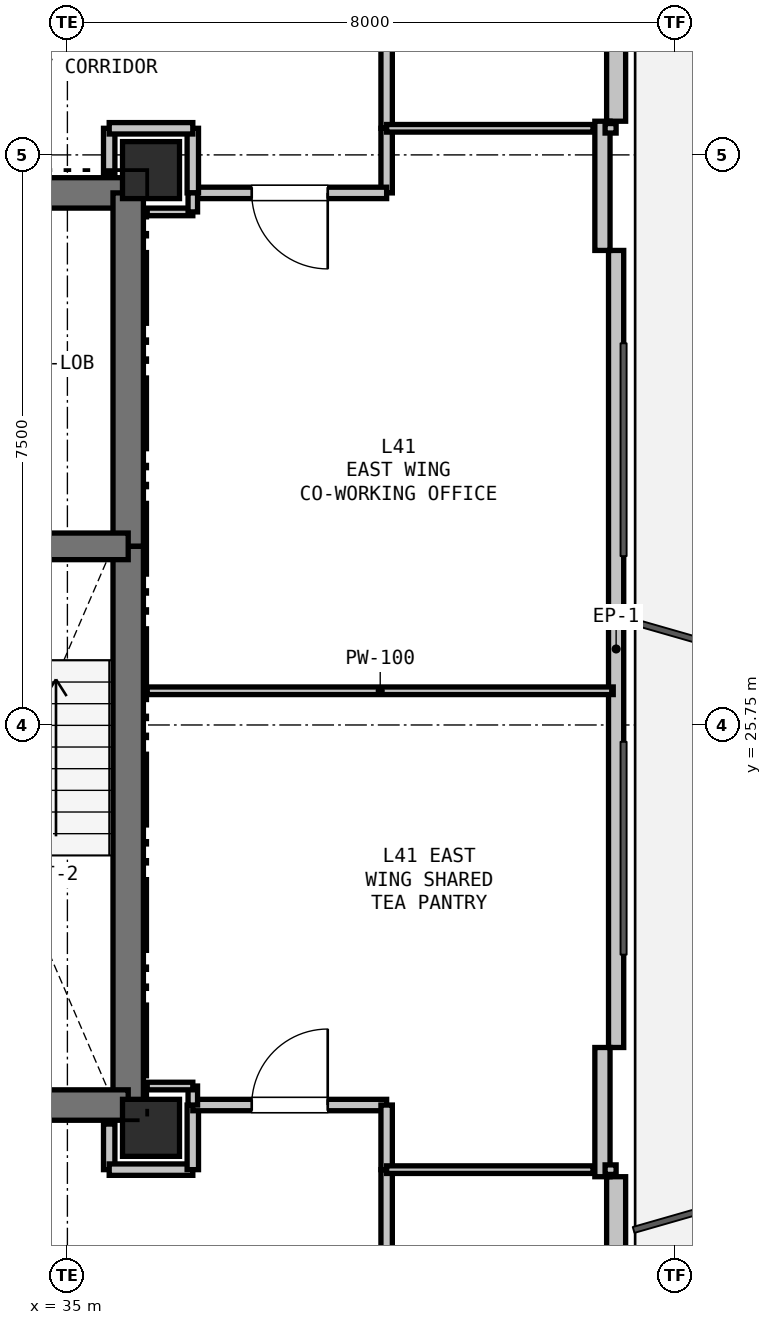
"""IFC4 building model, lengths in metres.
Left out: names, types, materials, properties, quantities, classifications, styles, units other than length and angle.
Written with IfcOpenShell. Run it as: python <this file> out.ifc"""

import sys

from ifc_helpers import new_model, si_unit, direction, frame, frame_2d, origin, origin_2d, place, context, subcontext, project, spatial, rectangle, extrude, element, fill, save


model = new_model("IFC4")
c1 = context("Model", 3, precision=1e-05, world=origin(), true_north=direction((0.0, 1.0)))
c2 = subcontext(c1, "Body", "Model", "MODEL_VIEW")
j1 = project(units=[si_unit("LENGTHUNIT", "METRE"), si_unit("PLANEANGLEUNIT", "RADIAN")], contexts=[c1])
p1 = place(None, origin())
s1 = spatial("IfcSite", under=j1, at=p1, CompositionType="ELEMENT")
p2 = place(p1, origin())
s2 = spatial("IfcBuilding", under=s1, at=p2, CompositionType="ELEMENT")
p3 = place(p2, frame((0.0, 0.0, 147.6)))
s3 = spatial("IfcBuildingStorey", under=s2, at=p3, CompositionType="ELEMENT", Elevation=147.6)
for number, where, z_axis, x_axis in (
    (1, (36.1, 33.05, 0.0), (0.0, 0.0, 1.0), (1.0, 0.0, 0.0)),
    (2, (36.1, 20.45, 0.0), (0.0, 0.0, 1.0), (1.0, 0.0, 0.0)),
):
    element("IfcColumn", number, at=place(p3, frame(where, z_axis=z_axis, x_axis=x_axis)), inside=s3, PredefinedType="COLUMN", context=c2, shape_type="SweptSolid", body=[
        extrude(rectangle(XDim=0.75, YDim=0.75, at=origin_2d()), origin(), (0.0, 0.0, 1.0), 3.3),
    ])
p4 = place(p3, frame((42.219, 44.879, 0.0), z_axis=(0.0, 0.0, 1.0), x_axis=(0.0, -1.0, 0.0)))
e3 = element("IfcWall", 3, at=p4, inside=s3, PredefinedType="SOLIDWALL", context=c2, shape_type="SweptSolid", body=[
    extrude(rectangle(XDim=11.186, YDim=0.25, at=frame_2d((5.593, 0.0))), origin(), (0.0, 0.0, 1.0), 2.68),
])
p5 = place(p4, frame((8.109, 0.0, 0.0)))
e4 = element("IfcOpeningElement", 4, at=p5, cuts=e3, PredefinedType="OPENING", context=c2, shape_type="SweptSolid", body=[
    extrude(rectangle(XDim=1.0, YDim=2.1, at=frame_2d((0.5, 1.05))), frame((0.0, 0.135, 0.0), z_axis=(0.0, -1.0, 0.0), x_axis=(1.0, 0.0, 0.0)), (0.0, 0.0, 1.0), 0.27),
])
p6 = place(p3, frame((42.219, 31.993, 0.0), z_axis=(0.0, 0.0, 1.0), x_axis=(0.0, -1.0, 0.0)))
e5 = element("IfcWall", 5, at=p6, inside=s3, PredefinedType="PARAPET", context=c2, shape_type="SweptSolid", body=[
    extrude(rectangle(XDim=10.486, YDim=0.2, at=frame_2d((5.243, 0.0))), origin(), (0.0, 0.0, 1.0), 0.2),
])
p7 = place(p3, frame((42.219, 19.807, 0.0), z_axis=(0.0, 0.0, 1.0), x_axis=(0.0, -1.0, 0.0)))
e6 = element("IfcWall", 6, at=p7, inside=s3, PredefinedType="SOLIDWALL", context=c2, shape_type="SweptSolid", body=[
    extrude(rectangle(XDim=11.186, YDim=0.25, at=frame_2d((5.593, 0.0))), origin(), (0.0, 0.0, 1.0), 2.68),
])
p8 = place(p7, frame((9.227, 0.0, 0.9)))
e7 = element("IfcOpeningElement", 7, at=p8, cuts=e6, PredefinedType="OPENING", context=c2, shape_type="SweptSolid", body=[
    extrude(rectangle(XDim=1.2, YDim=1.4, at=frame_2d((0.6, 0.7))), frame((0.0, 0.135, 0.0), z_axis=(0.0, -1.0, 0.0), x_axis=(1.0, 0.0, 0.0)), (0.0, 0.0, 1.0), 0.27),
])
for number, where, z_axis, x_axis in (
    (8, (42.039, 33.693, 0.0), (0.0, 0.0, 1.0), (0.0, -1.0, 0.0)),
    (9, (42.039, 21.507, 0.0), (0.0, 0.0, 1.0), (0.0, -1.0, 0.0)),
):
    element("IfcWall", number, at=place(p3, frame(where, z_axis=z_axis, x_axis=x_axis)), inside=s3, PredefinedType="PARAPET", context=c2, shape_type="SweptSolid", body=[
        extrude(rectangle(XDim=1.7, YDim=0.2, at=frame_2d((0.85, 0.0))), origin(), (0.0, 0.0, 1.0), 2.68),
    ])
p9 = place(p3, frame((32.35, 32.75, 0.0), z_axis=(0.0, 0.0, 1.0), x_axis=(1.0, 0.0, 0.0)))
e10 = element("IfcWall", 10, at=p9, inside=s3, PredefinedType="SHEAR", context=c2, shape_type="SweptSolid", body=[
    extrude(rectangle(XDim=3.45, YDim=0.4, at=frame_2d((1.725, 0.0))), origin(), (0.0, 0.0, 1.0), 3.06),
])
p10 = place(p9, frame((0.65, 0.0, 0.0)))
e11 = element("IfcOpeningElement", 11, at=p10, cuts=e10, PredefinedType="OPENING", context=c2, shape_type="SweptSolid", body=[
    extrude(rectangle(XDim=1.15, YDim=2.15, at=frame_2d((0.575, 1.075))), frame((0.0, 0.21, 0.0), z_axis=(0.0, -1.0, 0.0), x_axis=(1.0, 0.0, 0.0)), (0.0, 0.0, 1.0), 0.42),
])
p11 = place(p3, frame((35.8, 32.75, 0.0), z_axis=(0.0, 0.0, 1.0), x_axis=(0.0, -1.0, 0.0)))
e12 = element("IfcWall", 12, at=p11, inside=s3, PredefinedType="SHEAR", context=c2, shape_type="SweptSolid", body=[
    extrude(rectangle(XDim=4.65, YDim=0.4, at=frame_2d((2.325, 0.0))), origin(), (0.0, 0.0, 1.0), 3.06),
])
p12 = place(p3, frame((35.8, 28.1, 0.0), z_axis=(0.0, 0.0, 1.0), x_axis=(0.0, -1.0, 0.0)))
e13 = element("IfcWall", 13, at=p12, inside=s3, PredefinedType="SHEAR", context=c2, shape_type="SweptSolid", body=[
    extrude(rectangle(XDim=7.35, YDim=0.4, at=frame_2d((3.675, 0.0))), origin(), (0.0, 0.0, 1.0), 3.06),
])
p13 = place(p3, frame((35.8, 20.75, 0.0), z_axis=(0.0, 0.0, 1.0), x_axis=(-1.0, 0.0, 0.0)))
e14 = element("IfcWall", 14, at=p13, inside=s3, PredefinedType="SHEAR", context=c2, shape_type="SweptSolid", body=[
    extrude(rectangle(XDim=3.45, YDim=0.4, at=frame_2d((1.725, 0.0))), origin(), (0.0, 0.0, 1.0), 3.06),
])
p14 = place(p3, frame((32.35, 28.1, 0.0), z_axis=(0.0, 0.0, 1.0), x_axis=(1.0, 0.0, 0.0)))
e15 = element("IfcWall", 15, at=p14, inside=s3, PredefinedType="SHEAR", context=c2, shape_type="SweptSolid", body=[
    extrude(rectangle(XDim=3.45, YDim=0.35, at=frame_2d((1.725, 0.0))), origin(), (0.0, 0.0, 1.0), 3.06),
])
p15 = place(p14, frame((1.15, 0.0, 0.0)))
e16 = element("IfcOpeningElement", 16, at=p15, cuts=e15, PredefinedType="OPENING", context=c2, shape_type="SweptSolid", body=[
    extrude(rectangle(XDim=1.15, YDim=2.15, at=frame_2d((0.575, 1.075))), frame((0.0, 0.185, 0.0), z_axis=(0.0, -1.0, 0.0), x_axis=(1.0, 0.0, 0.0)), (0.0, 0.0, 1.0), 0.37),
])
p16 = place(p3, frame((35.55, 33.6, 0.0), z_axis=(0.0, 0.0, 1.0), x_axis=(0.0, -1.0, 0.0)))
e17 = element("IfcWall", 17, at=p16, inside=s3, PredefinedType="PARTITIONING", context=c2, shape_type="SweptSolid", body=[
    extrude(rectangle(XDim=0.6, YDim=0.15, at=frame_2d((0.3, 0.0))), origin(), (0.0, 0.0, 1.0), 2.585),
])
p17 = place(p3, frame((39.2, 35.35, 0.0), z_axis=(0.0, 0.0, 1.0), x_axis=(0.0, -1.0, 0.0)))
e18 = element("IfcWall", 18, at=p17, inside=s3, PredefinedType="PARTITIONING", context=c2, shape_type="SweptSolid", body=[
    extrude(rectangle(XDim=1.75, YDim=0.15, at=frame_2d((0.875, 0.0))), origin(), (0.0, 0.0, 1.0), 3.06),
])
p18 = place(p3, frame((39.2, 33.6, 0.0), z_axis=(0.0, 0.0, 1.0), x_axis=(0.0, -1.0, 0.0)))
e19 = element("IfcWall", 19, at=p18, inside=s3, PredefinedType="PARTITIONING", context=c2, shape_type="SweptSolid", body=[
    extrude(rectangle(XDim=0.85, YDim=0.15, at=frame_2d((0.425, 0.0))), origin(), (0.0, 0.0, 1.0), 3.06),
])
p19 = place(p3, frame((39.2, 32.75, 0.0), z_axis=(0.0, 0.0, 1.0), x_axis=(-1.0, 0.0, 0.0)))
e20 = element("IfcWall", 20, at=p19, inside=s3, PredefinedType="PARTITIONING", context=c2, shape_type="SweptSolid", body=[
    extrude(rectangle(XDim=2.55, YDim=0.15, at=frame_2d((1.275, 0.0))), origin(), (0.0, 0.0, 1.0), 3.06),
])
p20 = place(p19, frame((0.775, 0.0, 0.0)))
e21 = element("IfcOpeningElement", 21, at=p20, cuts=e20, PredefinedType="OPENING", context=c2, shape_type="SweptSolid", body=[
    extrude(rectangle(XDim=1.0, YDim=2.15, at=frame_2d((0.5, 1.075))), frame((0.0, 0.085, 0.0), z_axis=(0.0, -1.0, 0.0), x_axis=(1.0, 0.0, 0.0)), (0.0, 0.0, 1.0), 0.17),
])
p21 = place(p3, frame((36.65, 32.75, 0.0), z_axis=(0.0, 0.0, 1.0), x_axis=(0.0, 1.0, 0.0)))
e22 = element("IfcWall", 22, at=p21, inside=s3, PredefinedType="PARTITIONING", context=c2, shape_type="SweptSolid", body=[
    extrude(rectangle(XDim=0.85, YDim=0.15, at=frame_2d((0.425, 0.0))), origin(), (0.0, 0.0, 1.0), 2.433),
])
p22 = place(p3, frame((36.65, 33.6, 0.0), z_axis=(0.0, 0.0, 1.0), x_axis=(-1.0, 0.0, 0.0)))
e23 = element("IfcWall", 23, at=p22, inside=s3, PredefinedType="PARTITIONING", context=c2, shape_type="SweptSolid", body=[
    extrude(rectangle(XDim=1.1, YDim=0.15, at=frame_2d((0.55, 0.0))), origin(), (0.0, 0.0, 1.0), 2.433),
])
p23 = place(p3, frame((35.55, 20.5, 0.0), z_axis=(0.0, 0.0, 1.0), x_axis=(0.0, -1.0, 0.0)))
e24 = element("IfcWall", 24, at=p23, inside=s3, PredefinedType="PARTITIONING", context=c2, shape_type="SweptSolid", body=[
    extrude(rectangle(XDim=0.6, YDim=0.15, at=frame_2d((0.3, 0.0))), origin(), (0.0, 0.0, 1.0), 2.585),
])
p24 = place(p3, frame((35.55, 19.9, 0.0), z_axis=(0.0, 0.0, 1.0), x_axis=(1.0, 0.0, 0.0)))
e25 = element("IfcWall", 25, at=p24, inside=s3, PredefinedType="PARTITIONING", context=c2, shape_type="SweptSolid", body=[
    extrude(rectangle(XDim=1.1, YDim=0.15, at=frame_2d((0.55, 0.0))), origin(), (0.0, 0.0, 1.0), 2.433),
])
p25 = place(p3, frame((36.65, 19.9, 0.0), z_axis=(0.0, 0.0, 1.0), x_axis=(0.0, 1.0, 0.0)))
e26 = element("IfcWall", 26, at=p25, inside=s3, PredefinedType="PARTITIONING", context=c2, shape_type="SweptSolid", body=[
    extrude(rectangle(XDim=0.85, YDim=0.15, at=frame_2d((0.425, 0.0))), origin(), (0.0, 0.0, 1.0), 3.06),
])
p26 = place(p3, frame((36.65, 20.75, 0.0), z_axis=(0.0, 0.0, 1.0), x_axis=(1.0, 0.0, 0.0)))
e27 = element("IfcWall", 27, at=p26, inside=s3, PredefinedType="PARTITIONING", context=c2, shape_type="SweptSolid", body=[
    extrude(rectangle(XDim=2.55, YDim=0.15, at=frame_2d((1.275, 0.0))), origin(), (0.0, 0.0, 1.0), 3.06),
])
p27 = place(p26, frame((0.775, 0.0, 0.0)))
e28 = element("IfcOpeningElement", 28, at=p27, cuts=e27, PredefinedType="OPENING", context=c2, shape_type="SweptSolid", body=[
    extrude(rectangle(XDim=1.0, YDim=2.15, at=frame_2d((0.5, 1.075))), frame((0.0, 0.085, 0.0), z_axis=(0.0, -1.0, 0.0), x_axis=(1.0, 0.0, 0.0)), (0.0, 0.0, 1.0), 0.17),
])
p28 = place(p3, frame((39.2, 20.75, 0.0), z_axis=(0.0, 0.0, 1.0), x_axis=(0.0, -1.0, 0.0)))
e29 = element("IfcWall", 29, at=p28, inside=s3, PredefinedType="PARTITIONING", context=c2, shape_type="SweptSolid", body=[
    extrude(rectangle(XDim=0.85, YDim=0.15, at=frame_2d((0.425, 0.0))), origin(), (0.0, 0.0, 1.0), 3.06),
])
p29 = place(p3, frame((39.2, 19.9, 0.0), z_axis=(0.0, 0.0, 1.0), x_axis=(0.0, -1.0, 0.0)))
e30 = element("IfcWall", 30, at=p29, inside=s3, PredefinedType="PARTITIONING", context=c2, shape_type="SweptSolid", body=[
    extrude(rectangle(XDim=1.75, YDim=0.15, at=frame_2d((0.875, 0.0))), origin(), (0.0, 0.0, 1.0), 3.06),
])
p30 = place(p3, frame((36.05, 32.5, 0.0), z_axis=(0.0, 0.0, 1.0), x_axis=(1.0, 0.0, 0.0)))
e31 = element("IfcWall", 31, at=p30, inside=s3, PredefinedType="PARTITIONING", context=c2, shape_type="SweptSolid", body=[
    extrude(rectangle(XDim=0.6, YDim=0.1, at=frame_2d((0.3, 0.0))), origin(), (0.0, 0.0, 1.0), 2.585),
])
p31 = place(p3, frame((36.65, 32.5, 0.0), z_axis=(0.0, 0.0, 1.0), x_axis=(0.0, 1.0, 0.0)))
e32 = element("IfcWall", 32, at=p31, inside=s3, PredefinedType="PARTITIONING", context=c2, shape_type="SweptSolid", body=[
    extrude(rectangle(XDim=0.25, YDim=0.125, at=frame_2d((0.125, 0.0))), origin(), (0.0, 0.0, 1.0), 3.06),
])
p32 = place(p3, frame((39.2, 33.6, 0.0), z_axis=(0.0, 0.0, 1.0), x_axis=(1.0, 0.0, 0.0)))
e33 = element("IfcWall", 33, at=p32, inside=s3, PredefinedType="PARTITIONING", context=c2, shape_type="SweptSolid", body=[
    extrude(rectangle(XDim=2.715, YDim=0.1, at=frame_2d((1.358, 0.0))), origin(), (0.0, 0.0, 1.0), 2.365),
])
p33 = place(p3, frame((42.074, 33.6, 0.0), z_axis=(0.0, 0.0, 1.0), x_axis=(1.0, 0.0, 0.0)))
e34 = element("IfcWall", 34, at=p33, inside=s3, PredefinedType="PARTITIONING", context=c2, shape_type="SweptSolid", body=[
    extrude(rectangle(XDim=0.145, YDim=0.125, at=frame_2d((0.072, 0.0))), origin(), (0.0, 0.0, 1.0), 3.06),
])
p34 = place(p3, frame((42.181, 26.2, 0.0), z_axis=(0.0, 0.0, 1.0), x_axis=(-1.0, 0.0, 0.0)))
e35 = element("IfcWall", 35, at=p34, inside=s3, PredefinedType="PARTITIONING", context=c2, shape_type="SweptSolid", body=[
    extrude(rectangle(XDim=6.131, YDim=0.1, at=frame_2d((3.065, 0.0))), origin(), (0.0, 0.0, 1.0), 2.365),
])
p35 = place(p3, frame((36.65, 20.75, 0.0), z_axis=(0.0, 0.0, 1.0), x_axis=(0.0, 1.0, 0.0)))
e36 = element("IfcWall", 36, at=p35, inside=s3, PredefinedType="PARTITIONING", context=c2, shape_type="SweptSolid", body=[
    extrude(rectangle(XDim=0.25, YDim=0.125, at=frame_2d((0.125, 0.0))), origin(), (0.0, 0.0, 1.0), 3.06),
])
p36 = place(p3, frame((36.65, 21.0, 0.0), z_axis=(0.0, 0.0, 1.0), x_axis=(-1.0, 0.0, 0.0)))
e37 = element("IfcWall", 37, at=p36, inside=s3, PredefinedType="PARTITIONING", context=c2, shape_type="SweptSolid", body=[
    extrude(rectangle(XDim=0.6, YDim=0.1, at=frame_2d((0.3, 0.0))), origin(), (0.0, 0.0, 1.0), 2.585),
])
p37 = place(p3, frame((42.219, 19.9, 0.0), z_axis=(0.0, 0.0, 1.0), x_axis=(-1.0, 0.0, 0.0)))
e38 = element("IfcWall", 38, at=p37, inside=s3, PredefinedType="PARTITIONING", context=c2, shape_type="SweptSolid", body=[
    extrude(rectangle(XDim=0.145, YDim=0.125, at=frame_2d((0.072, 0.0))), origin(), (0.0, 0.0, 1.0), 3.06),
])
p38 = place(p3, frame((41.915, 19.9, 0.0), z_axis=(0.0, 0.0, 1.0), x_axis=(-1.0, 0.0, 0.0)))
e39 = element("IfcWall", 39, at=p38, inside=s3, PredefinedType="PARTITIONING", context=c2, shape_type="SweptSolid", body=[
    extrude(rectangle(XDim=2.715, YDim=0.1, at=frame_2d((1.358, 0.0))), origin(), (0.0, 0.0, 1.0), 2.365),
])
p39 = place(p20, origin())
e40 = element("IfcDoor", 40, at=p39, inside=s3, OperationType="SINGLE_SWING_LEFT", PredefinedType="DOOR", context=c2, shape_type="SweptSolid", body=[
    extrude(rectangle(XDim=1.0, YDim=2.15, at=frame_2d((0.5, 1.075))), frame((0.0, 0.025, 0.0), z_axis=(0.0, -1.0, 0.0), x_axis=(1.0, 0.0, 0.0)), (0.0, 0.0, 1.0), 0.05),
])
fill(e21, e40)
p40 = place(p27, origin())
e41 = element("IfcDoor", 41, at=p40, inside=s3, OperationType="SINGLE_SWING_RIGHT", PredefinedType="DOOR", context=c2, shape_type="SweptSolid", body=[
    extrude(rectangle(XDim=1.0, YDim=2.15, at=frame_2d((0.5, 1.075))), frame((0.0, 0.025, 0.0), z_axis=(0.0, -1.0, 0.0), x_axis=(1.0, 0.0, 0.0)), (0.0, 0.0, 1.0), 0.05),
])
fill(e28, e41)
save(model, sys.argv[1])
